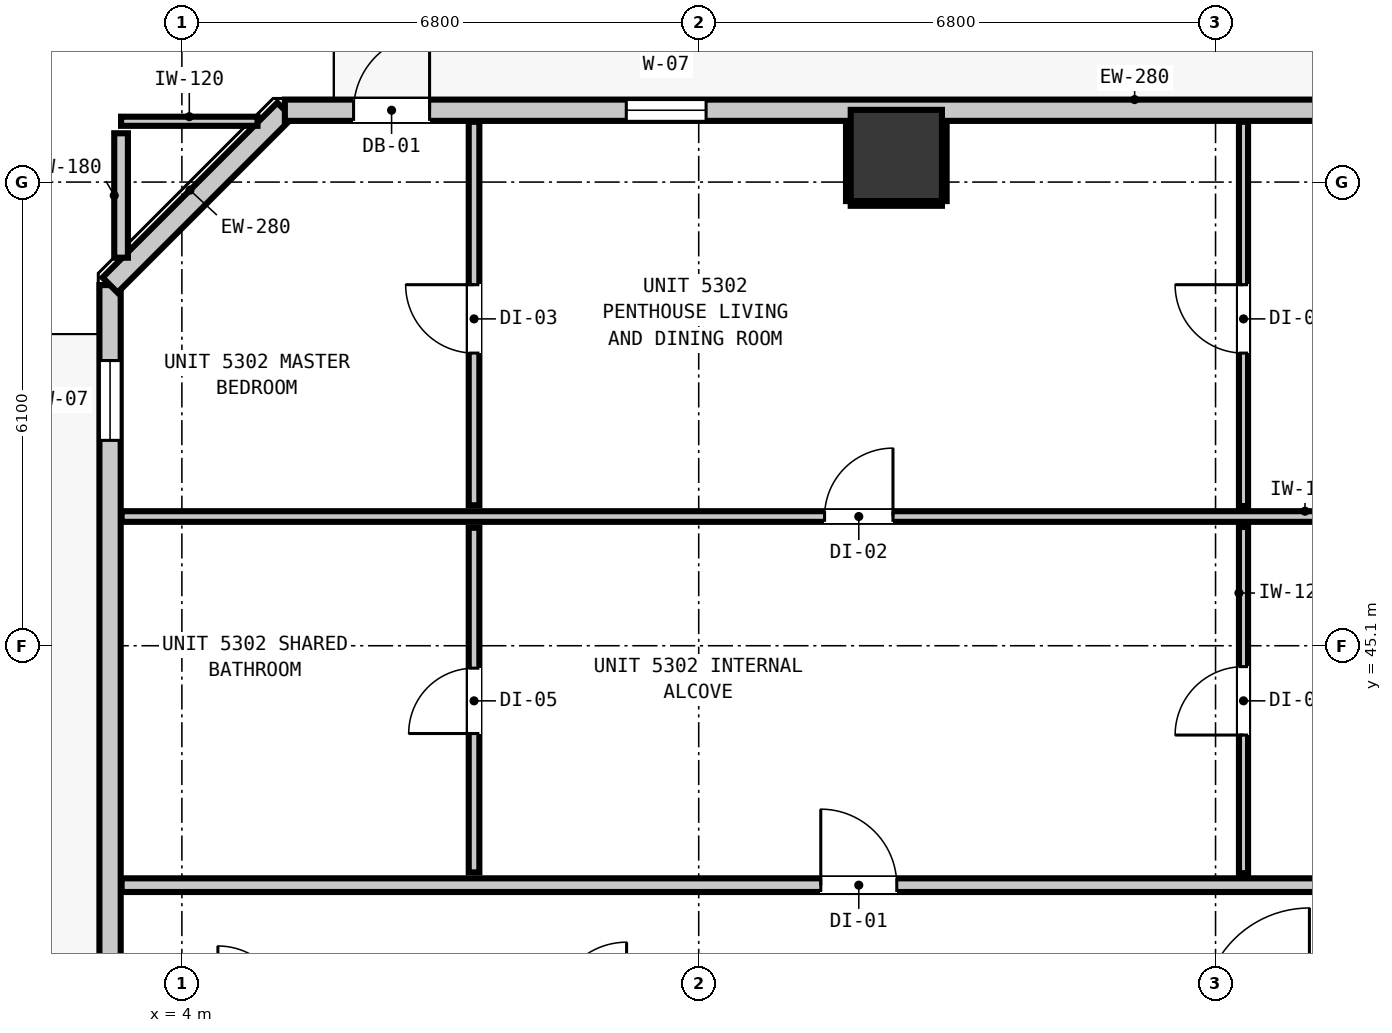
"""IFC4 building model, lengths in metres.
Left out: names, types, materials, properties, quantities, classifications, styles, units other than length and angle.
Written with IfcOpenShell. Run it as: python <this file> out.ifc"""

import sys

from ifc_helpers import new_model, si_unit, direction, frame, frame_2d, origin, origin_2d, place, context, subcontext, project, spatial, rectangle, extrude, element, fill, save


model = new_model("IFC4")
c1 = context("Model", 3, precision=1e-05, world=origin(), true_north=direction((0.0, 1.0)))
c2 = subcontext(c1, "Body", "Model", "MODEL_VIEW")
j1 = project(units=[si_unit("LENGTHUNIT", "METRE"), si_unit("PLANEANGLEUNIT", "RADIAN")], contexts=[c1])
p1 = place(None, origin())
s1 = spatial("IfcSite", under=j1, at=p1, CompositionType="ELEMENT")
p2 = place(p1, origin())
s2 = spatial("IfcBuilding", under=s1, at=p2, CompositionType="ELEMENT")
p3 = place(p2, frame((0.0, 0.0, 183.52)))
s3 = spatial("IfcBuildingStorey", under=s2, at=p3, CompositionType="ELEMENT", Elevation=183.52)
p4 = place(p3, frame((13.4, 51.55, 0.0), z_axis=(0.0, 0.0, 1.0), x_axis=(1.0, 0.0, 0.0)))
e1 = element("IfcColumn", 1, at=p4, inside=s3, PredefinedType="COLUMN", context=c2, shape_type="SweptSolid", body=[
    extrude(rectangle(XDim=1.2, YDim=1.2, at=origin_2d()), origin(), (0.0, 0.0, 1.0), 3.32),
])
p5 = place(p3, frame((3.055, 17.555, 0.0), z_axis=(0.0, 0.0, 1.0), x_axis=(0.0, 1.0, 0.0)))
e2 = element("IfcWall", 2, at=p5, inside=s3, PredefinedType="STANDARD", context=c2, shape_type="SweptSolid", body=[
    extrude(rectangle(XDim=32.29, YDim=0.28, at=frame_2d((16.145, 0.0))), origin(), (0.0, 0.0, 1.0), 3.08),
])
p6 = place(p5, frame((5.467, 0.0, 0.0)))
e3 = element("IfcOpeningElement", 3, at=p6, cuts=e2, PredefinedType="OPENING", context=c2, shape_type="SweptSolid", body=[
    extrude(rectangle(XDim=1.0, YDim=2.15, at=frame_2d((0.5, 1.075))), frame((0.0, 0.15, 0.0), z_axis=(0.0, -1.0, 0.0), x_axis=(1.0, 0.0, 0.0)), (0.0, 0.0, 1.0), 0.3),
])
p7 = place(p5, frame((30.247, 0.0, 0.85)))
e4 = element("IfcOpeningElement", 4, at=p7, cuts=e2, PredefinedType="OPENING", context=c2, shape_type="SweptSolid", body=[
    extrude(rectangle(XDim=1.05, YDim=1.65, at=frame_2d((0.525, 0.825))), frame((0.0, 0.15, 0.0), z_axis=(0.0, -1.0, 0.0), x_axis=(1.0, 0.0, 0.0)), (0.0, 0.0, 1.0), 0.3),
])
p8 = place(p5, frame((9.131, 0.0, 0.85)))
e5 = element("IfcOpeningElement", 5, at=p8, cuts=e2, PredefinedType="OPENING", context=c2, shape_type="SweptSolid", body=[
    extrude(rectangle(XDim=1.05, YDim=1.65, at=frame_2d((0.525, 0.825))), frame((0.0, 0.15, 0.0), z_axis=(0.0, -1.0, 0.0), x_axis=(1.0, 0.0, 0.0)), (0.0, 0.0, 1.0), 0.3),
])
p9 = place(p3, frame((3.055, 49.845, 0.0), z_axis=(0.0, 0.0, 1.0), x_axis=(0.707106781187, 0.707106781187, 0.0)))
e6 = element("IfcWall", 6, at=p9, inside=s3, PredefinedType="STANDARD", context=c2, shape_type="SweptSolid", body=[
    extrude(rectangle(XDim=3.253, YDim=0.28, at=frame_2d((1.626, 0.0))), origin(), (0.0, 0.0, 1.0), 3.08),
])
p10 = place(p3, frame((5.355, 52.145, 0.0), z_axis=(0.0, 0.0, 1.0), x_axis=(1.0, 0.0, 0.0)))
e7 = element("IfcWall", 7, at=p10, inside=s3, PredefinedType="STANDARD", context=c2, shape_type="SweptSolid", body=[
    extrude(rectangle(XDim=35.09, YDim=0.28, at=frame_2d((17.545, 0.0))), origin(), (0.0, 0.0, 1.0), 3.08),
])
p11 = place(p10, frame((0.904, 0.0, 0.0)))
e8 = element("IfcOpeningElement", 8, at=p11, cuts=e7, PredefinedType="OPENING", context=c2, shape_type="SweptSolid", body=[
    extrude(rectangle(XDim=1.0, YDim=2.15, at=frame_2d((0.5, 1.075))), frame((0.0, 0.15, 0.0), z_axis=(0.0, -1.0, 0.0), x_axis=(1.0, 0.0, 0.0)), (0.0, 0.0, 1.0), 0.3),
])
p12 = place(p10, frame((4.492, 0.0, 0.85)))
e9 = element("IfcOpeningElement", 9, at=p12, cuts=e7, PredefinedType="OPENING", context=c2, shape_type="SweptSolid", body=[
    extrude(rectangle(XDim=1.05, YDim=1.65, at=frame_2d((0.525, 0.825))), frame((0.0, 0.15, 0.0), z_axis=(0.0, -1.0, 0.0), x_axis=(1.0, 0.0, 0.0)), (0.0, 0.0, 1.0), 0.3),
])
p13 = place(p10, frame((16.819, 0.0, 0.85)))
e10 = element("IfcOpeningElement", 10, at=p13, cuts=e7, PredefinedType="OPENING", context=c2, shape_type="SweptSolid", body=[
    extrude(rectangle(XDim=1.05, YDim=1.65, at=frame_2d((0.525, 0.825))), frame((0.0, 0.15, 0.0), z_axis=(0.0, -1.0, 0.0), x_axis=(1.0, 0.0, 0.0)), (0.0, 0.0, 1.0), 0.3),
])
p14 = place(p10, frame((26.97, 0.0, 0.85)))
e11 = element("IfcOpeningElement", 11, at=p14, cuts=e7, PredefinedType="OPENING", context=c2, shape_type="SweptSolid", body=[
    extrude(rectangle(XDim=1.05, YDim=1.65, at=frame_2d((0.525, 0.825))), frame((0.0, 0.15, 0.0), z_axis=(0.0, -1.0, 0.0), x_axis=(1.0, 0.0, 0.0)), (0.0, 0.0, 1.0), 0.3),
])
p15 = place(p3, frame((3.207, 41.95, 0.0), z_axis=(0.0, 0.0, 1.0), x_axis=(1.0, 0.0, 0.0)))
e12 = element("IfcWall", 12, at=p15, inside=s3, PredefinedType="PARTITIONING", context=c2, shape_type="SweptSolid", body=[
    extrude(rectangle(XDim=39.386, YDim=0.18, at=frame_2d((19.693, 0.0))), origin(), (0.0, 0.0, 1.0), 3.08),
])
p16 = place(p15, frame((9.199, 0.0, 0.0)))
e13 = element("IfcOpeningElement", 13, at=p16, cuts=e12, PredefinedType="OPENING", context=c2, shape_type="SweptSolid", body=[
    extrude(rectangle(XDim=1.0, YDim=2.15, at=frame_2d((0.5, 1.075))), frame((0.0, 0.1, 0.0), z_axis=(0.0, -1.0, 0.0), x_axis=(1.0, 0.0, 0.0)), (0.0, 0.0, 1.0), 0.2),
])
p17 = place(p15, frame((29.668, 0.0, 0.0)))
e14 = element("IfcOpeningElement", 14, at=p17, cuts=e12, PredefinedType="OPENING", context=c2, shape_type="SweptSolid", body=[
    extrude(rectangle(XDim=0.9, YDim=2.1, at=frame_2d((0.45, 1.05))), frame((0.0, 0.1, 0.0), z_axis=(0.0, -1.0, 0.0), x_axis=(1.0, 0.0, 0.0)), (0.0, 0.0, 1.0), 0.2),
])
p18 = place(p3, frame((3.207, 46.8, 0.0), z_axis=(0.0, 0.0, 1.0), x_axis=(1.0, 0.0, 0.0)))
e15 = element("IfcWall", 15, at=p18, inside=s3, PredefinedType="PARTITIONING", context=c2, shape_type="SweptSolid", body=[
    extrude(rectangle(XDim=20.891, YDim=0.14, at=frame_2d((10.445, 0.0))), origin(), (0.0, 0.0, 1.0), 3.08),
])
p19 = place(p18, frame((9.249, 0.0, 0.0)))
e16 = element("IfcOpeningElement", 16, at=p19, cuts=e15, PredefinedType="OPENING", context=c2, shape_type="SweptSolid", body=[
    extrude(rectangle(XDim=0.9, YDim=2.1, at=frame_2d((0.45, 1.05))), frame((0.0, 0.08, 0.0), z_axis=(0.0, -1.0, 0.0), x_axis=(1.0, 0.0, 0.0)), (0.0, 0.0, 1.0), 0.16),
])
p20 = place(p3, frame((3.2, 52.0, 0.0), z_axis=(0.0, 0.0, 1.0), x_axis=(1.0, 0.0, 0.0)))
e17 = element("IfcWall", 17, at=p20, inside=s3, PredefinedType="PARTITIONING", context=c2, shape_type="SweptSolid", body=[
    extrude(rectangle(XDim=1.795, YDim=0.12, at=frame_2d((0.897, 0.0))), origin(), (0.0, 0.0, 1.0), 3.08),
])
p21 = place(p3, frame((3.2, 50.205, 0.0), z_axis=(0.0, 0.0, 1.0), x_axis=(0.0, 1.0, 0.0)))
e18 = element("IfcWall", 18, at=p21, inside=s3, PredefinedType="PARTITIONING", context=c2, shape_type="SweptSolid", body=[
    extrude(rectangle(XDim=1.637, YDim=0.18, at=frame_2d((0.818, 0.0))), origin(), (0.0, 0.0, 1.0), 3.08),
])
p22 = place(p3, frame((7.844, 42.118, 0.0), z_axis=(0.0, 0.0, 1.0), x_axis=(0.0, 1.0, 0.0)))
e19 = element("IfcWall", 19, at=p22, inside=s3, PredefinedType="PARTITIONING", context=c2, shape_type="SweptSolid", body=[
    extrude(rectangle(XDim=4.534, YDim=0.14, at=frame_2d((2.267, 0.0))), origin(), (0.0, 0.0, 1.0), 3.08),
])
p23 = place(p22, frame((1.827, 0.0, 0.0)))
e20 = element("IfcOpeningElement", 20, at=p23, cuts=e19, PredefinedType="OPENING", context=c2, shape_type="SweptSolid", body=[
    extrude(rectangle(XDim=0.86, YDim=2.02, at=frame_2d((0.43, 1.01))), frame((0.0, 0.08, 0.0), z_axis=(0.0, -1.0, 0.0), x_axis=(1.0, 0.0, 0.0)), (0.0, 0.0, 1.0), 0.16),
])
p24 = place(p3, frame((7.844, 46.948, 0.0), z_axis=(0.0, 0.0, 1.0), x_axis=(0.0, 1.0, 0.0)))
e21 = element("IfcWall", 21, at=p24, inside=s3, PredefinedType="PARTITIONING", context=c2, shape_type="SweptSolid", body=[
    extrude(rectangle(XDim=5.045, YDim=0.14, at=frame_2d((2.522, 0.0))), origin(), (0.0, 0.0, 1.0), 3.08),
])
p25 = place(p24, frame((2.002, 0.0, 0.0)))
e22 = element("IfcOpeningElement", 22, at=p25, cuts=e21, PredefinedType="OPENING", context=c2, shape_type="SweptSolid", body=[
    extrude(rectangle(XDim=0.9, YDim=2.1, at=frame_2d((0.45, 1.05))), frame((0.0, 0.08, 0.0), z_axis=(0.0, -1.0, 0.0), x_axis=(1.0, 0.0, 0.0)), (0.0, 0.0, 1.0), 0.16),
])
p26 = place(p3, frame((17.968, 42.108, 0.0), z_axis=(0.0, 0.0, 1.0), x_axis=(0.0, 1.0, 0.0)))
e23 = element("IfcWall", 23, at=p26, inside=s3, PredefinedType="PARTITIONING", context=c2, shape_type="SweptSolid", body=[
    extrude(rectangle(XDim=4.554, YDim=0.12, at=frame_2d((2.277, 0.0))), origin(), (0.0, 0.0, 1.0), 3.08),
])
p27 = place(p26, frame((1.817, 0.0, 0.0)))
e24 = element("IfcOpeningElement", 24, at=p27, cuts=e23, PredefinedType="OPENING", context=c2, shape_type="SweptSolid", body=[
    extrude(rectangle(XDim=0.9, YDim=2.1, at=frame_2d((0.45, 1.05))), frame((0.0, 0.07, 0.0), z_axis=(0.0, -1.0, 0.0), x_axis=(1.0, 0.0, 0.0)), (0.0, 0.0, 1.0), 0.14),
])
p28 = place(p3, frame((17.968, 46.938, 0.0), z_axis=(0.0, 0.0, 1.0), x_axis=(0.0, 1.0, 0.0)))
e25 = element("IfcWall", 25, at=p28, inside=s3, PredefinedType="PARTITIONING", context=c2, shape_type="SweptSolid", body=[
    extrude(rectangle(XDim=5.055, YDim=0.12, at=frame_2d((2.527, 0.0))), origin(), (0.0, 0.0, 1.0), 3.08),
])
p29 = place(p28, frame((2.012, 0.0, 0.0)))
e26 = element("IfcOpeningElement", 26, at=p29, cuts=e25, PredefinedType="OPENING", context=c2, shape_type="SweptSolid", body=[
    extrude(rectangle(XDim=0.9, YDim=2.1, at=frame_2d((0.45, 1.05))), frame((0.0, 0.07, 0.0), z_axis=(0.0, -1.0, 0.0), x_axis=(1.0, 0.0, 0.0)), (0.0, 0.0, 1.0), 0.14),
])
p30 = place(p3, frame((12.8, 50.918, 0.0), z_axis=(0.0, 0.0, 1.0), x_axis=(1.0, 0.0, 0.0)))
e27 = element("IfcWall", 27, at=p30, inside=s3, PredefinedType="PARTITIONING", context=c2, shape_type="SweptSolid", body=[
    extrude(rectangle(XDim=1.2, YDim=0.06, at=frame_2d((0.6, 0.0))), origin(), (0.0, 0.0, 1.0), 1.45),
])
for number, where, z_axis, x_axis in (
    (28, (12.768, 50.95, 0.0), (0.0, 0.0, 1.0), (0.0, 1.0, 0.0)),
    (29, (14.032, 50.95, 0.0), (0.0, 0.0, 1.0), (0.0, 1.0, 0.0)),
):
    element("IfcWall", number, at=place(p3, frame(where, z_axis=z_axis, x_axis=x_axis)), inside=s3, PredefinedType="PARTITIONING", context=c2, shape_type="SweptSolid", body=[
        extrude(rectangle(XDim=1.04, YDim=0.06, at=frame_2d((0.52, 0.0))), origin(), (0.0, 0.0, 1.0), 1.45),
    ])
p31 = place(p11, origin())
e30 = element("IfcDoor", 30, at=p31, inside=s3, OperationType="SINGLE_SWING_RIGHT", PredefinedType="DOOR", context=c2, shape_type="SweptSolid", body=[
    extrude(rectangle(XDim=1.0, YDim=2.15, at=frame_2d((0.5, 1.075))), frame((0.0, 0.025, 0.0), z_axis=(0.0, -1.0, 0.0), x_axis=(1.0, 0.0, 0.0)), (0.0, 0.0, 1.0), 0.05),
])
fill(e8, e30)
p32 = place(p7, origin())
e31 = element("IfcWindow", 31, at=p32, inside=s3, PartitioningType="SINGLE_PANEL", PredefinedType="WINDOW", context=c2, shape_type="SweptSolid", body=[
    extrude(rectangle(XDim=1.05, YDim=1.65, at=frame_2d((0.525, 0.825))), frame((0.0, 0.03, 0.0), z_axis=(0.0, -1.0, 0.0), x_axis=(1.0, 0.0, 0.0)), (0.0, 0.0, 1.0), 0.06),
])
fill(e4, e31)
p33 = place(p12, origin())
e32 = element("IfcWindow", 32, at=p33, inside=s3, PartitioningType="SINGLE_PANEL", PredefinedType="WINDOW", context=c2, shape_type="SweptSolid", body=[
    extrude(rectangle(XDim=1.05, YDim=1.65, at=frame_2d((0.525, 0.825))), frame((0.0, 0.03, 0.0), z_axis=(0.0, -1.0, 0.0), x_axis=(1.0, 0.0, 0.0)), (0.0, 0.0, 1.0), 0.06),
])
fill(e9, e32)
p34 = place(p16, origin())
e33 = element("IfcDoor", 33, at=p34, inside=s3, OperationType="SINGLE_SWING_LEFT", PredefinedType="DOOR", context=c2, shape_type="SweptSolid", body=[
    extrude(rectangle(XDim=1.0, YDim=2.15, at=frame_2d((0.5, 1.075))), frame((0.0, 0.025, 0.0), z_axis=(0.0, -1.0, 0.0), x_axis=(1.0, 0.0, 0.0)), (0.0, 0.0, 1.0), 0.05),
])
fill(e13, e33)
p35 = place(p19, origin())
e34 = element("IfcDoor", 34, at=p35, inside=s3, OperationType="SINGLE_SWING_RIGHT", PredefinedType="DOOR", context=c2, shape_type="SweptSolid", body=[
    extrude(rectangle(XDim=0.9, YDim=2.1, at=frame_2d((0.45, 1.05))), frame((0.0, 0.025, 0.0), z_axis=(0.0, -1.0, 0.0), x_axis=(1.0, 0.0, 0.0)), (0.0, 0.0, 1.0), 0.05),
])
fill(e16, e34)
p36 = place(p23, origin())
e35 = element("IfcDoor", 35, at=p36, inside=s3, OperationType="SINGLE_SWING_LEFT", PredefinedType="DOOR", context=c2, shape_type="SweptSolid", body=[
    extrude(rectangle(XDim=0.86, YDim=2.02, at=frame_2d((0.43, 1.01))), frame((0.0, 0.025, 0.0), z_axis=(0.0, -1.0, 0.0), x_axis=(1.0, 0.0, 0.0)), (0.0, 0.0, 1.0), 0.05),
])
fill(e20, e35)
p37 = place(p25, origin())
e36 = element("IfcDoor", 36, at=p37, inside=s3, OperationType="SINGLE_SWING_RIGHT", PredefinedType="DOOR", context=c2, shape_type="SweptSolid", body=[
    extrude(rectangle(XDim=0.9, YDim=2.1, at=frame_2d((0.45, 1.05))), frame((0.0, 0.025, 0.0), z_axis=(0.0, -1.0, 0.0), x_axis=(1.0, 0.0, 0.0)), (0.0, 0.0, 1.0), 0.05),
])
fill(e22, e36)
p38 = place(p27, origin())
e37 = element("IfcDoor", 37, at=p38, inside=s3, OperationType="SINGLE_SWING_LEFT", PredefinedType="DOOR", context=c2, shape_type="SweptSolid", body=[
    extrude(rectangle(XDim=0.9, YDim=2.1, at=frame_2d((0.45, 1.05))), frame((0.0, 0.025, 0.0), z_axis=(0.0, -1.0, 0.0), x_axis=(1.0, 0.0, 0.0)), (0.0, 0.0, 1.0), 0.05),
])
fill(e24, e37)
p39 = place(p29, origin())
e38 = element("IfcDoor", 38, at=p39, inside=s3, OperationType="SINGLE_SWING_RIGHT", PredefinedType="DOOR", context=c2, shape_type="SweptSolid", body=[
    extrude(rectangle(XDim=0.9, YDim=2.1, at=frame_2d((0.45, 1.05))), frame((0.0, 0.025, 0.0), z_axis=(0.0, -1.0, 0.0), x_axis=(1.0, 0.0, 0.0)), (0.0, 0.0, 1.0), 0.05),
])
fill(e26, e38)
save(model, sys.argv[1])
